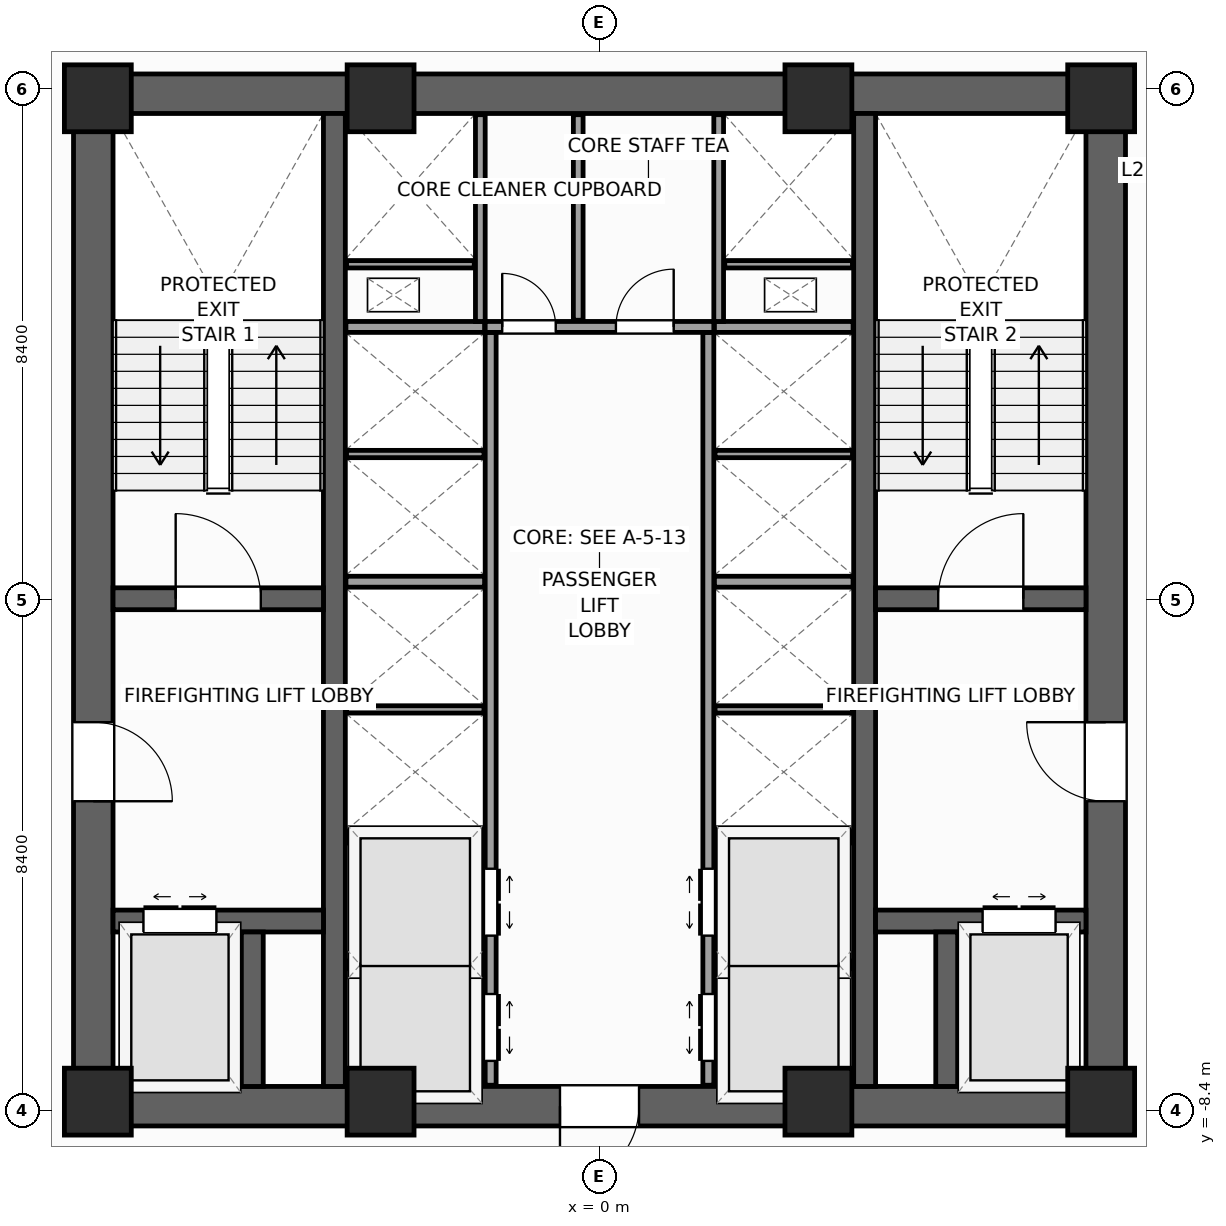
"""IFC4 building model, lengths in metres.
Left out: names, types, materials, properties, quantities, classifications, styles, units other than length and angle.
Written with IfcOpenShell. Run it as: python <this file> out.ifc"""

import sys

from ifc_helpers import new_model, si_unit, direction, frame, frame_2d, origin, origin_2d, place, context, subcontext, project, spatial, rectangle, extrude, source, transform, mapped, element, fill, save


model = new_model("IFC4")
c1 = context("Model", 3, precision=1e-05, world=origin(), true_north=direction((0.0, 1.0)))
c2 = subcontext(c1, "Body", "Model", "MODEL_VIEW")
j1 = project(units=[si_unit("LENGTHUNIT", "METRE"), si_unit("PLANEANGLEUNIT", "RADIAN")], contexts=[c1])
p1 = place(None, origin())
s1 = spatial("IfcSite", under=j1, at=p1, CompositionType="ELEMENT")
p2 = place(p1, origin())
s2 = spatial("IfcBuilding", under=s1, at=p2, CompositionType="ELEMENT")
p3 = place(p2, frame((0.0, 0.0, 91.2)))
s3 = spatial("IfcBuildingStorey", under=s2, at=p3, CompositionType="ELEMENT", Elevation=91.2)
p4 = place(p3, frame((-8.65, -8.325, 0.0), z_axis=(0.0, 0.0, 1.0), x_axis=(1.0, 0.0, 0.0)))
e1 = element("IfcWall", 1, at=p4, inside=s3, PredefinedType="SHEAR", context=c2, shape_type="SweptSolid", body=[
    extrude(rectangle(XDim=17.3, YDim=0.65, at=frame_2d((8.65, 0.0))), origin(), (0.0, 0.0, 1.0), 4.0),
])
p5 = place(p4, frame((8.0, 0.0, 0.0)))
e2 = element("IfcOpeningElement", 2, at=p5, cuts=e1, PredefinedType="OPENING", context=c2, shape_type="SweptSolid", body=[
    extrude(rectangle(XDim=1.3, YDim=2.2, at=frame_2d((0.65, 1.1))), frame((0.0, 0.335, 0.0), z_axis=(0.0, -1.0, 0.0), x_axis=(1.0, 0.0, 0.0)), (0.0, 0.0, 1.0), 0.67),
])
p6 = place(p3, frame((-8.65, 8.325, 0.0), z_axis=(0.0, 0.0, 1.0), x_axis=(1.0, 0.0, 0.0)))
e3 = element("IfcWall", 3, at=p6, inside=s3, PredefinedType="SHEAR", context=c2, shape_type="SweptSolid", body=[
    extrude(rectangle(XDim=17.3, YDim=0.65, at=frame_2d((8.65, 0.0))), origin(), (0.0, 0.0, 1.0), 4.0),
])
p7 = place(p3, frame((-8.325, -8.0, 0.0), z_axis=(0.0, 0.0, 1.0), x_axis=(0.0, 1.0, 0.0)))
e4 = element("IfcWall", 4, at=p7, inside=s3, PredefinedType="SHEAR", context=c2, shape_type="SweptSolid", body=[
    extrude(rectangle(XDim=16.0, YDim=0.65, at=frame_2d((8.0, 0.0))), origin(), (0.0, 0.0, 1.0), 4.0),
])
p8 = place(p7, frame((4.69, 0.0, 0.0)))
e5 = element("IfcOpeningElement", 5, at=p8, cuts=e4, PredefinedType="OPENING", context=c2, shape_type="SweptSolid", body=[
    extrude(rectangle(XDim=1.3, YDim=2.2, at=frame_2d((0.65, 1.1))), frame((0.0, 0.335, 0.0), z_axis=(0.0, -1.0, 0.0), x_axis=(1.0, 0.0, 0.0)), (0.0, 0.0, 1.0), 0.67),
])
p9 = place(p3, frame((8.325, -8.0, 0.0), z_axis=(0.0, 0.0, 1.0), x_axis=(0.0, 1.0, 0.0)))
e6 = element("IfcWall", 6, at=p9, inside=s3, PredefinedType="SHEAR", context=c2, shape_type="SweptSolid", body=[
    extrude(rectangle(XDim=16.0, YDim=0.65, at=frame_2d((8.0, 0.0))), origin(), (0.0, 0.0, 1.0), 4.0),
])
p10 = place(p9, frame((4.69, 0.0, 0.0)))
e7 = element("IfcOpeningElement", 7, at=p10, cuts=e6, PredefinedType="OPENING", context=c2, shape_type="SweptSolid", body=[
    extrude(rectangle(XDim=1.3, YDim=2.2, at=frame_2d((0.65, 1.1))), frame((0.0, 0.335, 0.0), z_axis=(0.0, -1.0, 0.0), x_axis=(1.0, 0.0, 0.0)), (0.0, 0.0, 1.0), 0.67),
])
for number, where, z_axis, x_axis in (
    (8, (-4.36, -8.0, 0.0), (0.0, 0.0, 1.0), (0.0, 1.0, 0.0)),
    (9, (4.36, -8.0, 0.0), (0.0, 0.0, 1.0), (0.0, 1.0, 0.0)),
):
    element("IfcWall", number, at=place(p3, frame(where, z_axis=z_axis, x_axis=x_axis)), inside=s3, PredefinedType="SHEAR", context=c2, shape_type="SweptSolid", body=[
        extrude(rectangle(XDim=16.0, YDim=0.36, at=frame_2d((8.0, 0.0))), origin(), (0.0, 0.0, 1.0), 4.0),
    ])
p11 = place(p3, frame((-8.0, 0.02, 0.0), z_axis=(0.0, 0.0, 1.0), x_axis=(1.0, 0.0, 0.0)))
e10 = element("IfcWall", 10, at=p11, inside=s3, PredefinedType="SHEAR", context=c2, shape_type="SweptSolid", body=[
    extrude(rectangle(XDim=3.46, YDim=0.36, at=frame_2d((1.73, 0.0))), origin(), (0.0, 0.0, 1.0), 4.0),
])
p12 = place(p11, frame((1.03, 0.0, 0.0)))
e11 = element("IfcOpeningElement", 11, at=p12, cuts=e10, PredefinedType="OPENING", context=c2, shape_type="SweptSolid", body=[
    extrude(rectangle(XDim=1.4, YDim=2.2, at=frame_2d((0.7, 1.1))), frame((0.0, 0.19, 0.0), z_axis=(0.0, -1.0, 0.0), x_axis=(1.0, 0.0, 0.0)), (0.0, 0.0, 1.0), 0.38),
])
p13 = place(p3, frame((4.54, 0.02, 0.0), z_axis=(0.0, 0.0, 1.0), x_axis=(1.0, 0.0, 0.0)))
e12 = element("IfcWall", 12, at=p13, inside=s3, PredefinedType="SHEAR", context=c2, shape_type="SweptSolid", body=[
    extrude(rectangle(XDim=3.46, YDim=0.36, at=frame_2d((1.73, 0.0))), origin(), (0.0, 0.0, 1.0), 4.0),
])
p14 = place(p13, frame((1.03, 0.0, 0.0)))
e13 = element("IfcOpeningElement", 13, at=p14, cuts=e12, PredefinedType="OPENING", context=c2, shape_type="SweptSolid", body=[
    extrude(rectangle(XDim=1.4, YDim=2.2, at=frame_2d((0.7, 1.1))), frame((0.0, 0.19, 0.0), z_axis=(0.0, -1.0, 0.0), x_axis=(1.0, 0.0, 0.0)), (0.0, 0.0, 1.0), 0.38),
])
p15 = place(p3, frame((-8.0, -5.28, 0.0), z_axis=(0.0, 0.0, 1.0), x_axis=(1.0, 0.0, 0.0)))
e14 = element("IfcWall", 14, at=p15, inside=s3, PredefinedType="SHEAR", context=c2, shape_type="SweptSolid", body=[
    extrude(rectangle(XDim=3.46, YDim=0.36, at=frame_2d((1.73, 0.0))), origin(), (0.0, 0.0, 1.0), 4.0),
])
p16 = place(p15, frame((0.5, 0.0, 0.0)))
e15 = element("IfcOpeningElement", 15, at=p16, cuts=e14, PredefinedType="OPENING", context=c2, shape_type="SweptSolid", body=[
    extrude(rectangle(XDim=1.2, YDim=2.25, at=frame_2d((0.6, 1.125))), frame((0.0, 0.19, 0.0), z_axis=(0.0, -1.0, 0.0), x_axis=(1.0, 0.0, 0.0)), (0.0, 0.0, 1.0), 0.38),
])
p17 = place(p3, frame((4.54, -5.28, 0.0), z_axis=(0.0, 0.0, 1.0), x_axis=(1.0, 0.0, 0.0)))
e16 = element("IfcWall", 16, at=p17, inside=s3, PredefinedType="SHEAR", context=c2, shape_type="SweptSolid", body=[
    extrude(rectangle(XDim=3.46, YDim=0.36, at=frame_2d((1.73, 0.0))), origin(), (0.0, 0.0, 1.0), 4.0),
])
p18 = place(p17, frame((1.76, 0.0, 0.0)))
e17 = element("IfcOpeningElement", 17, at=p18, cuts=e16, PredefinedType="OPENING", context=c2, shape_type="SweptSolid", body=[
    extrude(rectangle(XDim=1.2, YDim=2.25, at=frame_2d((0.6, 1.125))), frame((0.0, 0.19, 0.0), z_axis=(0.0, -1.0, 0.0), x_axis=(1.0, 0.0, 0.0)), (0.0, 0.0, 1.0), 0.38),
])
for number, where, z_axis, x_axis in (
    (18, (-5.71, -8.0, 0.0), (0.0, 0.0, 1.0), (0.0, 1.0, 0.0)),
    (19, (5.71, -8.0, 0.0), (0.0, 0.0, 1.0), (0.0, 1.0, 0.0)),
):
    element("IfcWall", number, at=place(p3, frame(where, z_axis=z_axis, x_axis=x_axis)), inside=s3, PredefinedType="SHEAR", context=c2, shape_type="SweptSolid", body=[
        extrude(rectangle(XDim=2.54, YDim=0.36, at=frame_2d((1.27, 0.0))), origin(), (0.0, 0.0, 1.0), 4.0),
    ])
m1 = source(origin(), c2, "Body", "SweptSolid", [
    extrude(rectangle(XDim=1.1, YDim=1.1, at=origin_2d()), origin(), (0.0, 0.0, 1.0), 4.0),
])
for number, where, z_axis, x_axis in (
    (20, (-8.25, -8.25, 0.0), (0.0, 0.0, 1.0), (1.0, 0.0, 0.0)),
    (21, (8.25, -8.25, 0.0), (0.0, 0.0, 1.0), (1.0, 0.0, 0.0)),
    (22, (8.25, 8.25, 0.0), (0.0, 0.0, 1.0), (1.0, 0.0, 0.0)),
    (23, (-8.25, 8.25, 0.0), (0.0, 0.0, 1.0), (1.0, 0.0, 0.0)),
    (24, (-3.6, -8.25, 0.0), (0.0, 0.0, 1.0), (1.0, 0.0, 0.0)),
    (25, (3.6, -8.25, 0.0), (0.0, 0.0, 1.0), (1.0, 0.0, 0.0)),
    (26, (-3.6, 8.25, 0.0), (0.0, 0.0, 1.0), (1.0, 0.0, 0.0)),
    (27, (3.6, 8.25, 0.0), (0.0, 0.0, 1.0), (1.0, 0.0, 0.0)),
):
    element("IfcColumn", number, at=place(p3, frame(where, z_axis=z_axis, x_axis=x_axis)), inside=s3, PredefinedType="PILASTER", context=c2, shape_type="MappedRepresentation", body=[
        mapped(m1, transform((0.0, 0.0, 0.0), scale=1.0)),
    ])
p19 = place(p3, frame((-1.79, -7.98, 0.0), z_axis=(0.0, 0.0, 1.0), x_axis=(0.0, 1.0, 0.0)))
e28 = element("IfcWall", 28, at=p19, inside=s3, PredefinedType="PARTITIONING", context=c2, shape_type="SweptSolid", body=[
    extrude(rectangle(XDim=12.38, YDim=0.18, at=frame_2d((6.19, 0.0))), origin(), (0.0, 0.0, 1.0), 3.74),
])
p20 = place(p19, frame((0.4, 0.0, 0.0)))
e29 = element("IfcOpeningElement", 29, at=p20, cuts=e28, PredefinedType="OPENING", context=c2, shape_type="SweptSolid", body=[
    extrude(rectangle(XDim=1.1, YDim=2.2, at=frame_2d((0.55, 1.1))), frame((0.0, 0.1, 0.0), z_axis=(0.0, -1.0, 0.0), x_axis=(1.0, 0.0, 0.0)), (0.0, 0.0, 1.0), 0.2),
])
p21 = place(p19, frame((2.46, 0.0, 0.0)))
e30 = element("IfcOpeningElement", 30, at=p21, cuts=e28, PredefinedType="OPENING", context=c2, shape_type="SweptSolid", body=[
    extrude(rectangle(XDim=1.1, YDim=2.2, at=frame_2d((0.55, 1.1))), frame((0.0, 0.1, 0.0), z_axis=(0.0, -1.0, 0.0), x_axis=(1.0, 0.0, 0.0)), (0.0, 0.0, 1.0), 0.2),
])
p22 = place(p3, frame((1.79, -7.98, 0.0), z_axis=(0.0, 0.0, 1.0), x_axis=(0.0, 1.0, 0.0)))
e31 = element("IfcWall", 31, at=p22, inside=s3, PredefinedType="PARTITIONING", context=c2, shape_type="SweptSolid", body=[
    extrude(rectangle(XDim=12.38, YDim=0.18, at=frame_2d((6.19, 0.0))), origin(), (0.0, 0.0, 1.0), 3.74),
])
p23 = place(p22, frame((0.4, 0.0, 0.0)))
e32 = element("IfcOpeningElement", 32, at=p23, cuts=e31, PredefinedType="OPENING", context=c2, shape_type="SweptSolid", body=[
    extrude(rectangle(XDim=1.1, YDim=2.2, at=frame_2d((0.55, 1.1))), frame((0.0, 0.1, 0.0), z_axis=(0.0, -1.0, 0.0), x_axis=(1.0, 0.0, 0.0)), (0.0, 0.0, 1.0), 0.2),
])
p24 = place(p22, frame((2.46, 0.0, 0.0)))
e33 = element("IfcOpeningElement", 33, at=p24, cuts=e31, PredefinedType="OPENING", context=c2, shape_type="SweptSolid", body=[
    extrude(rectangle(XDim=1.1, YDim=2.2, at=frame_2d((0.55, 1.1))), frame((0.0, 0.1, 0.0), z_axis=(0.0, -1.0, 0.0), x_axis=(1.0, 0.0, 0.0)), (0.0, 0.0, 1.0), 0.2),
])
p25 = place(p3, frame((-1.88, 4.49, 0.0), z_axis=(0.0, 0.0, 1.0), x_axis=(1.0, 0.0, 0.0)))
e34 = element("IfcWall", 34, at=p25, inside=s3, PredefinedType="PARTITIONING", context=c2, shape_type="SweptSolid", body=[
    extrude(rectangle(XDim=3.76, YDim=0.18, at=frame_2d((1.88, 0.0))), origin(), (0.0, 0.0, 1.0), 3.74),
])
p26 = place(p25, frame((0.28, 0.0, 0.0)))
e35 = element("IfcOpeningElement", 35, at=p26, cuts=e34, PredefinedType="OPENING", context=c2, shape_type="SweptSolid", body=[
    extrude(rectangle(XDim=0.88, YDim=2.1, at=frame_2d((0.44, 1.05))), frame((0.0, 0.1, 0.0), z_axis=(0.0, -1.0, 0.0), x_axis=(1.0, 0.0, 0.0)), (0.0, 0.0, 1.0), 0.2),
])
p27 = place(p25, frame((2.15, 0.0, 0.0)))
e36 = element("IfcOpeningElement", 36, at=p27, cuts=e34, PredefinedType="OPENING", context=c2, shape_type="SweptSolid", body=[
    extrude(rectangle(XDim=0.95, YDim=2.1, at=frame_2d((0.475, 1.05))), frame((0.0, 0.1, 0.0), z_axis=(0.0, -1.0, 0.0), x_axis=(1.0, 0.0, 0.0)), (0.0, 0.0, 1.0), 0.2),
])
for number, where, z_axis, x_axis in (
    (37, (-4.17, -3.9, 0.0), (0.0, 0.0, 1.0), (1.0, 0.0, 0.0)),
    (38, (1.89, -3.9, 0.0), (0.0, 0.0, 1.0), (1.0, 0.0, 0.0)),
    (39, (-4.17, 0.3, 0.0), (0.0, 0.0, 1.0), (1.0, 0.0, 0.0)),
    (40, (1.89, 0.3, 0.0), (0.0, 0.0, 1.0), (1.0, 0.0, 0.0)),
    (41, (-4.17, 4.49, 0.0), (0.0, 0.0, 1.0), (1.0, 0.0, 0.0)),
    (42, (1.89, 4.49, 0.0), (0.0, 0.0, 1.0), (1.0, 0.0, 0.0)),
):
    element("IfcWall", number, at=place(p3, frame(where, z_axis=z_axis, x_axis=x_axis)), inside=s3, PredefinedType="PARTITIONING", context=c2, shape_type="SweptSolid", body=[
        extrude(rectangle(XDim=2.28, YDim=0.18, at=frame_2d((1.14, 0.0))), origin(), (0.0, 0.0, 1.0), 3.74),
    ])
for number, where, z_axis, x_axis in (
    (43, (-4.16, -6.0, 0.0), (0.0, 0.0, 1.0), (1.0, 0.0, 0.0)),
    (44, (1.9, -6.0, 0.0), (0.0, 0.0, 1.0), (1.0, 0.0, 0.0)),
    (45, (-4.16, -1.8, 0.0), (0.0, 0.0, 1.0), (1.0, 0.0, 0.0)),
    (46, (1.9, -1.8, 0.0), (0.0, 0.0, 1.0), (1.0, 0.0, 0.0)),
    (47, (-4.16, 2.4, 0.0), (0.0, 0.0, 1.0), (1.0, 0.0, 0.0)),
    (48, (1.9, 2.4, 0.0), (0.0, 0.0, 1.0), (1.0, 0.0, 0.0)),
):
    element("IfcWall", number, at=place(p3, frame(where, z_axis=z_axis, x_axis=x_axis)), inside=s3, PredefinedType="PARTITIONING", context=c2, shape_type="SweptSolid", body=[
        extrude(rectangle(XDim=2.26, YDim=0.12, at=frame_2d((1.13, 0.0))), origin(), (0.0, 0.0, 1.0), 3.74),
    ])
for number, where, z_axis, x_axis in (
    (49, (-1.96, 4.58, 0.0), (0.0, 0.0, 1.0), (0.0, 1.0, 0.0)),
    (50, (1.96, 4.58, 0.0), (0.0, 0.0, 1.0), (0.0, 1.0, 0.0)),
):
    element("IfcWall", number, at=place(p3, frame(where, z_axis=z_axis, x_axis=x_axis)), inside=s3, PredefinedType="PARTITIONING", context=c2, shape_type="SweptSolid", body=[
        extrude(rectangle(XDim=3.4, YDim=0.16, at=frame_2d((1.7, 0.0))), origin(), (0.0, 0.0, 1.0), 3.74),
    ])
for number, where, z_axis, x_axis in (
    (51, (-4.16, 5.52, 0.0), (0.0, 0.0, 1.0), (1.0, 0.0, 0.0)),
    (52, (2.06, 5.52, 0.0), (0.0, 0.0, 1.0), (1.0, 0.0, 0.0)),
):
    element("IfcWall", number, at=place(p3, frame(where, z_axis=z_axis, x_axis=x_axis)), inside=s3, PredefinedType="PARTITIONING", context=c2, shape_type="SweptSolid", body=[
        extrude(rectangle(XDim=2.1, YDim=0.12, at=frame_2d((1.05, 0.0))), origin(), (0.0, 0.0, 1.0), 3.74),
    ])
p28 = place(p3, frame((-0.35, 4.6, 0.0), z_axis=(0.0, 0.0, 1.0), x_axis=(0.0, 1.0, 0.0)))
e53 = element("IfcWall", 53, at=p28, inside=s3, PredefinedType="PARTITIONING", context=c2, shape_type="SweptSolid", body=[
    extrude(rectangle(XDim=3.38, YDim=0.16, at=frame_2d((1.69, 0.0))), origin(), (0.0, 0.0, 1.0), 3.74),
])
m2 = source(origin(), c2, "Body", "SweptSolid", [
    extrude(rectangle(XDim=1.4, YDim=2.2, at=frame_2d((0.7, 1.1))), frame((0.0, 0.025, 0.0), z_axis=(0.0, -1.0, 0.0), x_axis=(1.0, 0.0, 0.0)), (0.0, 0.0, 1.0), 0.05),
])
p29 = place(p12, origin())
e54 = element("IfcDoor", 54, at=p29, inside=s3, OperationType="SINGLE_SWING_LEFT", PredefinedType="DOOR", context=c2, shape_type="MappedRepresentation", body=[
    mapped(m2, transform((0.0, 0.0, 0.0), scale=1.0)),
])
fill(e11, e54)
p30 = place(p14, origin())
e55 = element("IfcDoor", 55, at=p30, inside=s3, OperationType="SINGLE_SWING_RIGHT", PredefinedType="DOOR", context=c2, shape_type="MappedRepresentation", body=[
    mapped(m2, transform((0.0, 0.0, 0.0), scale=1.0)),
])
fill(e13, e55)
m3 = source(origin(), c2, "Body", "SweptSolid", [
    extrude(rectangle(XDim=1.3, YDim=2.2, at=frame_2d((0.65, 1.1))), frame((0.0, 0.025, 0.0), z_axis=(0.0, -1.0, 0.0), x_axis=(1.0, 0.0, 0.0)), (0.0, 0.0, 1.0), 0.05),
])
p31 = place(p8, frame((1.3, 0.0, 0.0), z_axis=(0.0, 0.0, 1.0), x_axis=(-1.0, 0.0, 0.0)))
e56 = element("IfcDoor", 56, at=p31, inside=s3, OperationType="SINGLE_SWING_LEFT", PredefinedType="DOOR", context=c2, shape_type="MappedRepresentation", body=[
    mapped(m3, transform((0.0, 0.0, 0.0), scale=1.0)),
])
fill(e5, e56)
p32 = place(p10, origin())
e57 = element("IfcDoor", 57, at=p32, inside=s3, OperationType="SINGLE_SWING_RIGHT", PredefinedType="DOOR", context=c2, shape_type="MappedRepresentation", body=[
    mapped(m3, transform((0.0, 0.0, 0.0), scale=1.0)),
])
fill(e7, e57)
p33 = place(p5, frame((1.3, 0.0, 0.0), z_axis=(0.0, 0.0, 1.0), x_axis=(-1.0, 0.0, 0.0)))
e58 = element("IfcDoor", 58, at=p33, inside=s3, OperationType="SINGLE_SWING_LEFT", PredefinedType="DOOR", context=c2, shape_type="MappedRepresentation", body=[
    mapped(m3, transform((0.0, 0.0, 0.0), scale=1.0)),
])
fill(e2, e58)
m4 = source(origin(), c2, "Body", "SweptSolid", [
    extrude(rectangle(XDim=1.2, YDim=2.25, at=frame_2d((0.6, 1.125))), frame((0.0, 0.025, 0.0), z_axis=(0.0, -1.0, 0.0), x_axis=(1.0, 0.0, 0.0)), (0.0, 0.0, 1.0), 0.05),
])
p34 = place(p16, origin())
e59 = element("IfcDoor", 59, at=p34, inside=s3, OperationType="DOUBLE_DOOR_SLIDING", PredefinedType="DOOR", context=c2, shape_type="MappedRepresentation", body=[
    mapped(m4, transform((0.0, 0.0, 0.0), scale=1.0)),
])
fill(e15, e59)
p35 = place(p18, origin())
e60 = element("IfcDoor", 60, at=p35, inside=s3, OperationType="DOUBLE_DOOR_SLIDING", PredefinedType="DOOR", context=c2, shape_type="MappedRepresentation", body=[
    mapped(m4, transform((0.0, 0.0, 0.0), scale=1.0)),
])
fill(e17, e60)
m5 = source(origin(), c2, "Body", "SweptSolid", [
    extrude(rectangle(XDim=1.1, YDim=2.2, at=frame_2d((0.55, 1.1))), frame((0.0, 0.025, 0.0), z_axis=(0.0, -1.0, 0.0), x_axis=(1.0, 0.0, 0.0)), (0.0, 0.0, 1.0), 0.05),
])
p36 = place(p20, frame((1.1, 0.0, 0.0), z_axis=(0.0, 0.0, 1.0), x_axis=(-1.0, 0.0, 0.0)))
e61 = element("IfcDoor", 61, at=p36, inside=s3, OperationType="DOUBLE_DOOR_SLIDING", PredefinedType="DOOR", context=c2, shape_type="MappedRepresentation", body=[
    mapped(m5, transform((0.0, 0.0, 0.0), scale=1.0)),
])
fill(e29, e61)
p37 = place(p21, frame((1.1, 0.0, 0.0), z_axis=(0.0, 0.0, 1.0), x_axis=(-1.0, 0.0, 0.0)))
e62 = element("IfcDoor", 62, at=p37, inside=s3, OperationType="DOUBLE_DOOR_SLIDING", PredefinedType="DOOR", context=c2, shape_type="MappedRepresentation", body=[
    mapped(m5, transform((0.0, 0.0, 0.0), scale=1.0)),
])
fill(e30, e62)
p38 = place(p23, origin())
e63 = element("IfcDoor", 63, at=p38, inside=s3, OperationType="DOUBLE_DOOR_SLIDING", PredefinedType="DOOR", context=c2, shape_type="MappedRepresentation", body=[
    mapped(m5, transform((0.0, 0.0, 0.0), scale=1.0)),
])
fill(e32, e63)
p39 = place(p24, origin())
e64 = element("IfcDoor", 64, at=p39, inside=s3, OperationType="DOUBLE_DOOR_SLIDING", PredefinedType="DOOR", context=c2, shape_type="MappedRepresentation", body=[
    mapped(m5, transform((0.0, 0.0, 0.0), scale=1.0)),
])
fill(e33, e64)
m6 = source(origin(), c2, "Body", "SweptSolid", [
    extrude(rectangle(XDim=0.88, YDim=2.1, at=frame_2d((0.44, 1.05))), frame((0.0, 0.025, 0.0), z_axis=(0.0, -1.0, 0.0), x_axis=(1.0, 0.0, 0.0)), (0.0, 0.0, 1.0), 0.05),
])
p40 = place(p26, origin())
e65 = element("IfcDoor", 65, at=p40, inside=s3, OperationType="SINGLE_SWING_LEFT", PredefinedType="DOOR", context=c2, shape_type="MappedRepresentation", body=[
    mapped(m6, transform((0.0, 0.0, 0.0), scale=1.0)),
])
fill(e35, e65)
m7 = source(origin(), c2, "Body", "SweptSolid", [
    extrude(rectangle(XDim=0.95, YDim=2.1, at=frame_2d((0.475, 1.05))), frame((0.0, 0.025, 0.0), z_axis=(0.0, -1.0, 0.0), x_axis=(1.0, 0.0, 0.0)), (0.0, 0.0, 1.0), 0.05),
])
p41 = place(p27, origin())
e66 = element("IfcDoor", 66, at=p41, inside=s3, OperationType="SINGLE_SWING_RIGHT", PredefinedType="DOOR", context=c2, shape_type="MappedRepresentation", body=[
    mapped(m7, transform((0.0, 0.0, 0.0), scale=1.0)),
])
fill(e36, e66)
save(model, sys.argv[1])
